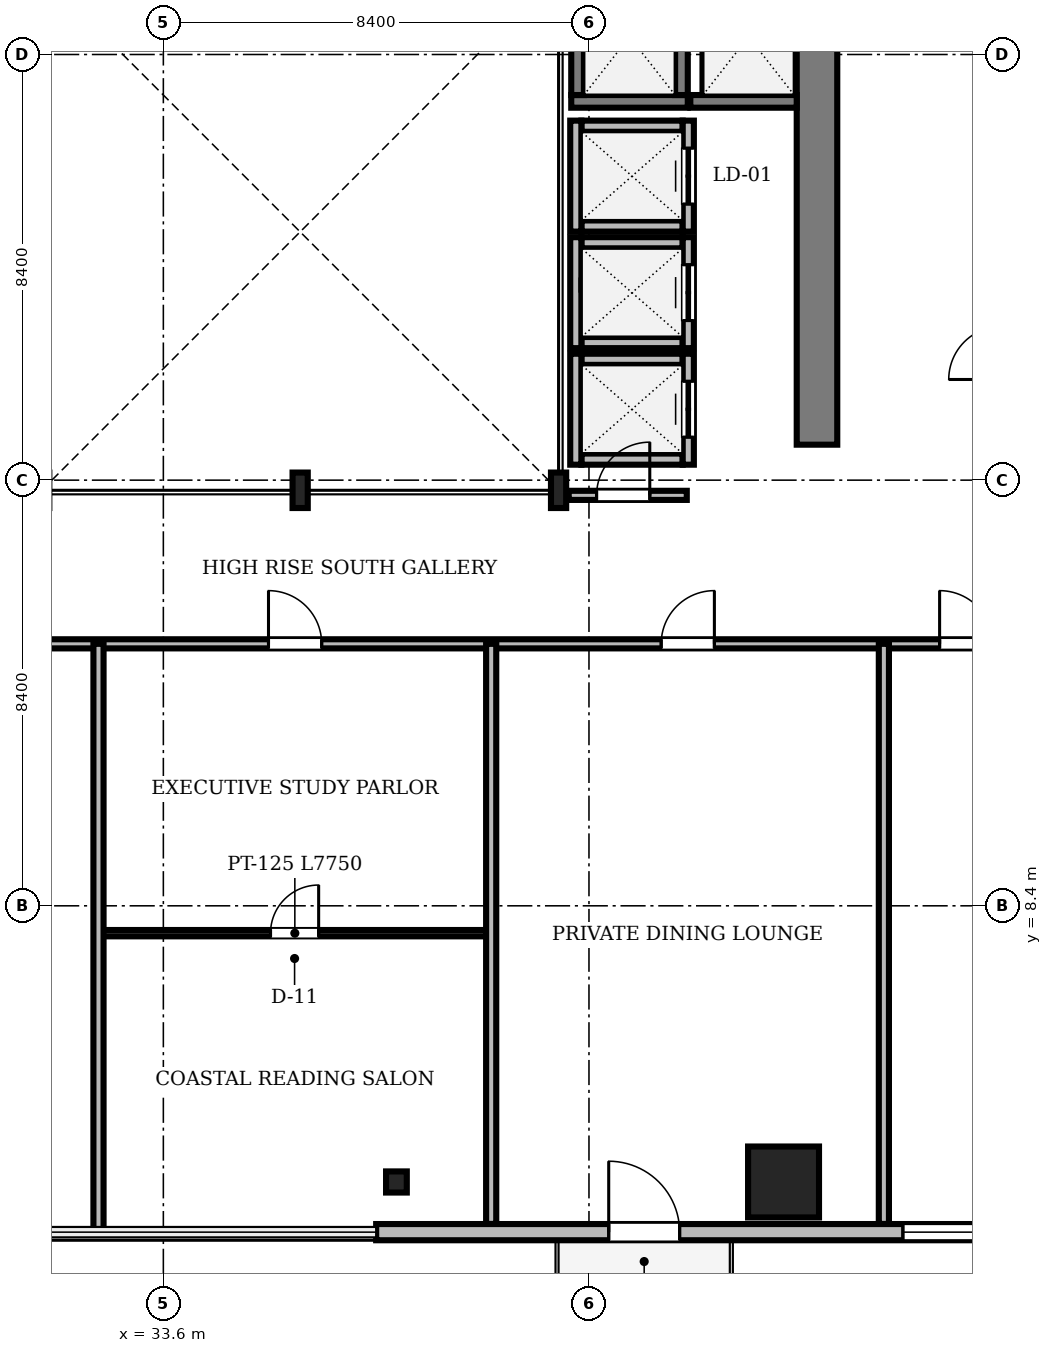
"""IFC4 building model, lengths in metres.
Left out: names, types, materials, properties, quantities, classifications, styles, units other than length and angle.
Written with IfcOpenShell. Run it as: python <this file> out.ifc"""

import sys

from ifc_helpers import new_model, si_unit, direction, frame, frame_2d, origin, origin_2d, place, context, subcontext, project, spatial, rectangle, i_section, extrude, source, transform, mapped, element, fill, save


model = new_model("IFC4")
c1 = context("Model", 3, precision=1e-05, world=origin(), true_north=direction((0.0, 1.0)))
c2 = subcontext(c1, "Body", "Model", "MODEL_VIEW")
j1 = project(units=[si_unit("LENGTHUNIT", "METRE"), si_unit("PLANEANGLEUNIT", "RADIAN")], contexts=[c1])
p1 = place(None, origin())
s1 = spatial("IfcSite", under=j1, at=p1, CompositionType="ELEMENT")
p2 = place(p1, origin())
s2 = spatial("IfcBuilding", under=s1, at=p2, CompositionType="ELEMENT")
p3 = place(p2, frame((0.0, 0.0, 192.3)))
s3 = spatial("IfcBuildingStorey", under=s2, at=p3, CompositionType="ELEMENT", Elevation=192.3)
m1 = source(origin(), c2, "Body", "SweptSolid", [
    extrude(rectangle(XDim=13.15, YDim=0.8, at=frame_2d((6.575, 0.0))), origin(), (0.0, 0.0, 1.0), 3.53),
])
p4 = place(p3, frame((46.5, 17.5, 0.0), z_axis=(0.0, 0.0, 1.0), x_axis=(0.0, 1.0, 0.0)))
e1 = element("IfcWall", 1, at=p4, inside=s3, PredefinedType="SHEAR", context=c2, shape_type="MappedRepresentation", body=[
    mapped(m1, transform((0.0, 0.0, 0.0), scale=1.0)),
])
m2 = source(origin(), c2, "Body", "SweptSolid", [
    extrude(i_section(OverallWidth=0.3, OverallDepth=0.7, WebThickness=0.017, FlangeThickness=0.032, FilletRadius=0.027, at=origin_2d()), origin(), (0.0, 0.0, 1.0), 3.53),
])
for number, where, z_axis, x_axis in (
    (2, (36.3, 16.6, 0.0), (0.0, 0.0, 1.0), (1.0, 0.0, 0.0)),
    (3, (41.4, 16.6, 0.0), (0.0, 0.0, 1.0), (1.0, 0.0, 0.0)),
):
    element("IfcColumn", number, at=place(p3, frame(where, z_axis=z_axis, x_axis=x_axis)), inside=s3, PredefinedType="COLUMN", context=c2, shape_type="MappedRepresentation", body=[
        mapped(m2, transform((0.0, 0.0, 0.0), scale=1.0)),
    ])
m3 = source(origin(), c2, "Body", "SweptSolid", [
    extrude(rectangle(XDim=1.4, YDim=1.4, at=origin_2d()), origin(), (0.0, 0.0, 1.0), 3.53),
])
p5 = place(p3, frame((45.84, 2.95, 0.0), z_axis=(0.0, 0.0, 1.0), x_axis=(1.0, 0.0, 0.0)))
e4 = element("IfcColumn", 4, at=p5, inside=s3, PredefinedType="COLUMN", context=c2, shape_type="MappedRepresentation", body=[
    mapped(m3, transform((0.0, 0.0, 0.0), scale=1.0)),
])
m4 = source(origin(), c2, "Body", "SweptSolid", [
    extrude(i_section(OverallWidth=0.409, OverallDepth=0.417, WebThickness=0.021, FlangeThickness=0.033, FilletRadius=0.015, at=origin_2d()), origin(), (0.0, 0.0, 1.0), 3.53),
])
p6 = place(p3, frame((38.2, 2.95, 0.0), z_axis=(0.0, 0.0, 1.0), x_axis=(1.0, 0.0, 0.0)))
e5 = element("IfcColumn", 5, at=p6, inside=s3, PredefinedType="COLUMN", context=c2, shape_type="MappedRepresentation", body=[
    mapped(m4, transform((0.0, 0.0, 0.0), scale=1.0)),
])
m5 = source(origin(), c2, "Body", "SweptSolid", [
    extrude(rectangle(XDim=15.6, YDim=0.32, at=frame_2d((7.8, 0.0))), origin(), (0.0, 0.0, 1.0), 3.53),
])
p7 = place(p3, frame((37.8, 1.96, 0.0), z_axis=(0.0, 0.0, 1.0), x_axis=(1.0, 0.0, 0.0)))
e6 = element("IfcWall", 6, at=p7, inside=s3, PredefinedType="SOLIDWALL", context=c2, shape_type="MappedRepresentation", body=[
    mapped(m5, transform((0.0, 0.0, 0.0), scale=1.0)),
])
m6 = source(origin(), c2, "Body", "SweptSolid", [
    extrude(rectangle(XDim=1.4, YDim=2.3, at=frame_2d((0.7, 1.15))), frame((0.0, 0.17, 0.0), z_axis=(0.0, -1.0, 0.0), x_axis=(1.0, 0.0, 0.0)), (0.0, 0.0, 1.0), 0.34),
])
p8 = place(p7, frame((4.59, 0.0, 0.0)))
e7 = element("IfcOpeningElement", 7, at=p8, cuts=e6, PredefinedType="OPENING", context=c2, shape_type="MappedRepresentation", body=[
    mapped(m6, transform((0.0, 0.0, 0.0), scale=1.0)),
])
m7 = source(origin(), c2, "Body", "SweptSolid", [
    extrude(rectangle(XDim=2.2, YDim=2.4, at=frame_2d((1.1, 1.2))), frame((0.0, 0.17, 0.0), z_axis=(0.0, -1.0, 0.0), x_axis=(1.0, 0.0, 0.0)), (0.0, 0.0, 1.0), 0.34),
])
p9 = place(p7, frame((10.395, 0.0, 0.72)))
e8 = element("IfcOpeningElement", 8, at=p9, cuts=e6, PredefinedType="OPENING", context=c2, shape_type="MappedRepresentation", body=[
    mapped(m7, transform((0.0, 0.0, 0.0), scale=1.0)),
])
m8 = source(origin(), c2, "Body", "SweptSolid", [
    extrude(rectangle(XDim=2.0, YDim=0.22, at=frame_2d((1.0, 0.0))), origin(), (0.0, 0.0, 1.0), 3.53),
])
for number, where, z_axis, x_axis in (
    (9, (41.85, 21.815, 0.0), (0.0, 0.0, 1.0), (1.0, 0.0, 0.0)),
    (10, (41.85, 23.785, 0.0), (0.0, 0.0, 1.0), (1.0, 0.0, 0.0)),
):
    element("IfcWall", number, at=place(p3, frame(where, z_axis=z_axis, x_axis=x_axis)), inside=s3, PredefinedType="SOLIDWALL", context=c2, shape_type="MappedRepresentation", body=[
        mapped(m8, transform((0.0, 0.0, 0.0), scale=1.0)),
    ])
m9 = source(origin(), c2, "Body", "SweptSolid", [
    extrude(rectangle(XDim=2.19, YDim=0.22, at=frame_2d((1.095, 0.0))), origin(), (0.0, 0.0, 1.0), 3.53),
])
p10 = place(p3, frame((41.74, 21.705, 0.0), z_axis=(0.0, 0.0, 1.0), x_axis=(0.0, 1.0, 0.0)))
e11 = element("IfcWall", 11, at=p10, inside=s3, PredefinedType="SOLIDWALL", context=c2, shape_type="MappedRepresentation", body=[
    mapped(m9, transform((0.0, 0.0, 0.0), scale=1.0)),
])
p11 = place(p3, frame((43.96, 21.705, 0.0), z_axis=(0.0, 0.0, 1.0), x_axis=(0.0, 1.0, 0.0)))
e12 = element("IfcWall", 12, at=p11, inside=s3, PredefinedType="SOLIDWALL", context=c2, shape_type="MappedRepresentation", body=[
    mapped(m9, transform((0.0, 0.0, 0.0), scale=1.0)),
])
m10 = source(origin(), c2, "Body", "SweptSolid", [
    extrude(rectangle(XDim=1.1, YDim=2.2, at=frame_2d((0.55, 1.1))), frame((0.0, 0.12, 0.0), z_axis=(0.0, -1.0, 0.0), x_axis=(1.0, 0.0, 0.0)), (0.0, 0.0, 1.0), 0.24),
])
p12 = place(p11, frame((0.545, 0.0, 0.0)))
e13 = element("IfcOpeningElement", 13, at=p12, cuts=e12, PredefinedType="OPENING", context=c2, shape_type="MappedRepresentation", body=[
    mapped(m10, transform((0.0, 0.0, 0.0), scale=1.0)),
])
for number, where, z_axis, x_axis in (
    (14, (41.85, 19.515, 0.0), (0.0, 0.0, 1.0), (1.0, 0.0, 0.0)),
    (15, (41.85, 21.485, 0.0), (0.0, 0.0, 1.0), (1.0, 0.0, 0.0)),
):
    element("IfcWall", number, at=place(p3, frame(where, z_axis=z_axis, x_axis=x_axis)), inside=s3, PredefinedType="SOLIDWALL", context=c2, shape_type="MappedRepresentation", body=[
        mapped(m8, transform((0.0, 0.0, 0.0), scale=1.0)),
    ])
p13 = place(p3, frame((41.74, 19.405, 0.0), z_axis=(0.0, 0.0, 1.0), x_axis=(0.0, 1.0, 0.0)))
e16 = element("IfcWall", 16, at=p13, inside=s3, PredefinedType="SOLIDWALL", context=c2, shape_type="MappedRepresentation", body=[
    mapped(m9, transform((0.0, 0.0, 0.0), scale=1.0)),
])
p14 = place(p3, frame((43.96, 19.405, 0.0), z_axis=(0.0, 0.0, 1.0), x_axis=(0.0, 1.0, 0.0)))
e17 = element("IfcWall", 17, at=p14, inside=s3, PredefinedType="SOLIDWALL", context=c2, shape_type="MappedRepresentation", body=[
    mapped(m9, transform((0.0, 0.0, 0.0), scale=1.0)),
])
p15 = place(p14, frame((0.545, 0.0, 0.0)))
e18 = element("IfcOpeningElement", 18, at=p15, cuts=e17, PredefinedType="OPENING", context=c2, shape_type="MappedRepresentation", body=[
    mapped(m10, transform((0.0, 0.0, 0.0), scale=1.0)),
])
for number, where, z_axis, x_axis in (
    (19, (41.85, 17.215, 0.0), (0.0, 0.0, 1.0), (1.0, 0.0, 0.0)),
    (20, (41.85, 19.185, 0.0), (0.0, 0.0, 1.0), (1.0, 0.0, 0.0)),
):
    element("IfcWall", number, at=place(p3, frame(where, z_axis=z_axis, x_axis=x_axis)), inside=s3, PredefinedType="SOLIDWALL", context=c2, shape_type="MappedRepresentation", body=[
        mapped(m8, transform((0.0, 0.0, 0.0), scale=1.0)),
    ])
p16 = place(p3, frame((41.74, 17.105, 0.0), z_axis=(0.0, 0.0, 1.0), x_axis=(0.0, 1.0, 0.0)))
e21 = element("IfcWall", 21, at=p16, inside=s3, PredefinedType="SOLIDWALL", context=c2, shape_type="MappedRepresentation", body=[
    mapped(m9, transform((0.0, 0.0, 0.0), scale=1.0)),
])
p17 = place(p3, frame((43.96, 17.105, 0.0), z_axis=(0.0, 0.0, 1.0), x_axis=(0.0, 1.0, 0.0)))
e22 = element("IfcWall", 22, at=p17, inside=s3, PredefinedType="SOLIDWALL", context=c2, shape_type="MappedRepresentation", body=[
    mapped(m9, transform((0.0, 0.0, 0.0), scale=1.0)),
])
p18 = place(p17, frame((0.545, 0.0, 0.0)))
e23 = element("IfcOpeningElement", 23, at=p18, cuts=e22, PredefinedType="OPENING", context=c2, shape_type="MappedRepresentation", body=[
    mapped(m10, transform((0.0, 0.0, 0.0), scale=1.0)),
])
m11 = source(origin(), c2, "Body", "SweptSolid", [
    extrude(rectangle(XDim=2.3, YDim=0.25, at=frame_2d((1.15, 0.0))), origin(), (0.0, 0.0, 1.0), 3.53),
])
for number, where, z_axis, x_axis in (
    (24, (41.65, 24.275, 0.0), (0.0, 0.0, 1.0), (1.0, 0.0, 0.0)),
    (25, (41.775, 24.4, 0.0), (0.0, 0.0, 1.0), (0.0, 1.0, 0.0)),
    (26, (43.825, 24.4, 0.0), (0.0, 0.0, 1.0), (0.0, 1.0, 0.0)),
):
    element("IfcWall", number, at=place(p3, frame(where, z_axis=z_axis, x_axis=x_axis)), inside=s3, PredefinedType="SOLIDWALL", context=c2, shape_type="MappedRepresentation", body=[
        mapped(m11, transform((0.0, 0.0, 0.0), scale=1.0)),
    ])
m12 = source(origin(), c2, "Body", "SweptSolid", [
    extrude(rectangle(XDim=2.1, YDim=0.25, at=frame_2d((1.05, 0.0))), origin(), (0.0, 0.0, 1.0), 3.53),
])
p19 = place(p3, frame((44.0, 24.275, 0.0), z_axis=(0.0, 0.0, 1.0), x_axis=(1.0, 0.0, 0.0)))
e27 = element("IfcWall", 27, at=p19, inside=s3, PredefinedType="SOLIDWALL", context=c2, shape_type="MappedRepresentation", body=[
    mapped(m12, transform((0.0, 0.0, 0.0), scale=1.0)),
])
m13 = source(origin(), c2, "Body", "SweptSolid", [
    extrude(rectangle(XDim=46.156, YDim=0.18, at=frame_2d((23.078, 0.0))), origin(), (0.0, 0.0, 1.0), 2.772),
])
p20 = place(p3, frame((11.422, 13.57, 0.0), z_axis=(0.0, 0.0, 1.0), x_axis=(1.0, 0.0, 0.0)))
e28 = element("IfcWall", 28, at=p20, inside=s3, PredefinedType="PARTITIONING", context=c2, shape_type="MappedRepresentation", body=[
    mapped(m13, transform((0.0, 0.0, 0.0), scale=1.0)),
])
m14 = source(origin(), c2, "Body", "SweptSolid", [
    extrude(rectangle(XDim=1.05, YDim=2.2, at=frame_2d((0.525, 1.1))), frame((0.0, 0.1, 0.0), z_axis=(0.0, -1.0, 0.0), x_axis=(1.0, 0.0, 0.0)), (0.0, 0.0, 1.0), 0.2),
])
p21 = place(p20, frame((11.798, 0.0, 0.0)))
e29 = element("IfcOpeningElement", 29, at=p21, cuts=e28, PredefinedType="OPENING", context=c2, shape_type="MappedRepresentation", body=[
    mapped(m14, transform((0.0, 0.0, 0.0), scale=1.0)),
])
p22 = place(p20, frame((16.503, 0.0, 0.0)))
e30 = element("IfcOpeningElement", 30, at=p22, cuts=e28, PredefinedType="OPENING", context=c2, shape_type="MappedRepresentation", body=[
    mapped(m14, transform((0.0, 0.0, 0.0), scale=1.0)),
])
p23 = place(p20, frame((24.253, 0.0, 0.0)))
e31 = element("IfcOpeningElement", 31, at=p23, cuts=e28, PredefinedType="OPENING", context=c2, shape_type="MappedRepresentation", body=[
    mapped(m14, transform((0.0, 0.0, 0.0), scale=1.0)),
])
p24 = place(p20, frame((32.003, 0.0, 0.0)))
e32 = element("IfcOpeningElement", 32, at=p24, cuts=e28, PredefinedType="OPENING", context=c2, shape_type="MappedRepresentation", body=[
    mapped(m14, transform((0.0, 0.0, 0.0), scale=1.0)),
])
p25 = place(p20, frame((37.498, 0.0, 0.0)))
e33 = element("IfcOpeningElement", 33, at=p25, cuts=e28, PredefinedType="OPENING", context=c2, shape_type="MappedRepresentation", body=[
    mapped(m14, transform((0.0, 0.0, 0.0), scale=1.0)),
])
m15 = source(origin(), c2, "Body", "SweptSolid", [
    extrude(rectangle(XDim=7.75, YDim=0.125, at=frame_2d((3.875, 0.0))), origin(), (0.0, 0.0, 1.0), 2.972),
])
p26 = place(p3, frame((32.32, 7.86, 0.0), z_axis=(0.0, 0.0, 1.0), x_axis=(1.0, 0.0, 0.0)))
e34 = element("IfcWall", 34, at=p26, inside=s3, PredefinedType="PARTITIONING", context=c2, shape_type="MappedRepresentation", body=[
    mapped(m15, transform((0.0, 0.0, 0.0), scale=1.0)),
])
m16 = source(origin(), c2, "Body", "SweptSolid", [
    extrude(rectangle(XDim=0.95, YDim=2.15, at=frame_2d((0.475, 1.075))), frame((0.0, 0.073, 0.0), z_axis=(0.0, -1.0, 0.0), x_axis=(1.0, 0.0, 0.0)), (0.0, 0.0, 1.0), 0.145),
])
p27 = place(p26, frame((3.395, 0.0, 0.0)))
e35 = element("IfcOpeningElement", 35, at=p27, cuts=e34, PredefinedType="OPENING", context=c2, shape_type="MappedRepresentation", body=[
    mapped(m16, transform((0.0, 0.0, 0.0), scale=1.0)),
])
m17 = source(origin(), c2, "Body", "SweptSolid", [
    extrude(rectangle(XDim=2.33, YDim=0.18, at=frame_2d((1.165, 0.0))), origin(), (0.0, 0.0, 1.0), 2.972),
])
p28 = place(p3, frame((41.6, 16.5, 0.0), z_axis=(0.0, 0.0, 1.0), x_axis=(1.0, 0.0, 0.0)))
e36 = element("IfcWall", 36, at=p28, inside=s3, PredefinedType="PARTITIONING", context=c2, shape_type="MappedRepresentation", body=[
    mapped(m17, transform((0.0, 0.0, 0.0), scale=1.0)),
])
p29 = place(p28, frame((0.55, 0.0, 0.0)))
e37 = element("IfcOpeningElement", 37, at=p29, cuts=e36, PredefinedType="OPENING", context=c2, shape_type="MappedRepresentation", body=[
    mapped(m14, transform((0.0, 0.0, 0.0), scale=1.0)),
])
m18 = source(origin(), c2, "Body", "SweptSolid", [
    extrude(rectangle(XDim=11.64, YDim=0.2, at=frame_2d((5.82, 0.0))), origin(), (0.0, 0.0, 1.0), 2.772),
])
p30 = place(p3, frame((32.32, 1.93, 0.0), z_axis=(0.0, 0.0, 1.0), x_axis=(0.0, 1.0, 0.0)))
e38 = element("IfcWall", 38, at=p30, inside=s3, PredefinedType="PARTITIONING", context=c2, shape_type="MappedRepresentation", body=[
    mapped(m18, transform((0.0, 0.0, 0.0), scale=1.0)),
])
m19 = source(origin(), c2, "Body", "SweptSolid", [
    extrude(rectangle(XDim=11.448, YDim=0.2, at=frame_2d((5.724, 0.0))), origin(), (0.0, 0.0, 1.0), 2.772),
])
for number, where, z_axis, x_axis in (
    (39, (40.07, 2.122, 0.0), (0.0, 0.0, 1.0), (0.0, 1.0, 0.0)),
    (40, (47.82, 2.122, 0.0), (0.0, 0.0, 1.0), (0.0, 1.0, 0.0)),
):
    element("IfcWall", number, at=place(p3, frame(where, z_axis=z_axis, x_axis=x_axis)), inside=s3, PredefinedType="PARTITIONING", context=c2, shape_type="MappedRepresentation", body=[
        mapped(m19, transform((0.0, 0.0, 0.0), scale=1.0)),
    ])
m20 = source(origin(), c2, "Body", "SweptSolid", [
    extrude(rectangle(XDim=1.858, YDim=0.18, at=frame_2d((0.929, 0.0))), origin(), (0.0, 0.0, 1.0), 3.53),
])
p31 = place(p3, frame((41.852, 20.65, 0.0), z_axis=(0.0, 0.0, 1.0), x_axis=(1.0, 0.0, 0.0)))
e41 = element("IfcWall", 41, at=p31, inside=s3, PredefinedType="PARTITIONING", context=c2, shape_type="MappedRepresentation", body=[
    mapped(m20, transform((0.0, 0.0, 0.0), scale=1.0)),
])
m21 = source(origin(), c2, "Body", "SweptSolid", [
    extrude(rectangle(XDim=1.4, YDim=2.3, at=frame_2d((0.7, 1.15))), frame((0.0, 0.025, 0.0), z_axis=(0.0, -1.0, 0.0), x_axis=(1.0, 0.0, 0.0)), (0.0, 0.0, 1.0), 0.05),
])
p32 = place(p8, frame((1.4, 0.0, 0.0), z_axis=(0.0, 0.0, 1.0), x_axis=(-1.0, 0.0, 0.0)))
e42 = element("IfcDoor", 42, at=p32, inside=s3, OperationType="DOUBLE_DOOR_SLIDING", PredefinedType="DOOR", context=c2, shape_type="MappedRepresentation", body=[
    mapped(m21, transform((0.0, 0.0, 0.0), scale=1.0)),
])
fill(e7, e42)
m22 = source(origin(), c2, "Body", "SweptSolid", [
    extrude(rectangle(XDim=2.2, YDim=2.4, at=frame_2d((1.1, 1.2))), frame((0.0, 0.03, 0.0), z_axis=(0.0, -1.0, 0.0), x_axis=(1.0, 0.0, 0.0)), (0.0, 0.0, 1.0), 0.06),
])
p33 = place(p9, origin())
e43 = element("IfcWindow", 43, at=p33, inside=s3, PartitioningType="SINGLE_PANEL", PredefinedType="WINDOW", context=c2, shape_type="MappedRepresentation", body=[
    mapped(m22, transform((0.0, 0.0, 0.0), scale=1.0)),
])
fill(e8, e43)
m23 = source(origin(), c2, "Body", "SweptSolid", [
    extrude(rectangle(XDim=1.1, YDim=2.2, at=frame_2d((0.55, 1.1))), frame((0.0, 0.025, 0.0), z_axis=(0.0, -1.0, 0.0), x_axis=(1.0, 0.0, 0.0)), (0.0, 0.0, 1.0), 0.05),
])
p34 = place(p12, origin())
e44 = element("IfcDoor", 44, at=p34, inside=s3, OperationType="DOUBLE_DOOR_SLIDING", PredefinedType="DOOR", context=c2, shape_type="MappedRepresentation", body=[
    mapped(m23, transform((0.0, 0.0, 0.0), scale=1.0)),
])
fill(e13, e44)
p35 = place(p15, origin())
e45 = element("IfcDoor", 45, at=p35, inside=s3, OperationType="DOUBLE_DOOR_SLIDING", PredefinedType="DOOR", context=c2, shape_type="MappedRepresentation", body=[
    mapped(m23, transform((0.0, 0.0, 0.0), scale=1.0)),
])
fill(e18, e45)
p36 = place(p18, origin())
e46 = element("IfcDoor", 46, at=p36, inside=s3, OperationType="DOUBLE_DOOR_SLIDING", PredefinedType="DOOR", context=c2, shape_type="MappedRepresentation", body=[
    mapped(m23, transform((0.0, 0.0, 0.0), scale=1.0)),
])
fill(e23, e46)
m24 = source(origin(), c2, "Body", "SweptSolid", [
    extrude(rectangle(XDim=1.05, YDim=2.2, at=frame_2d((0.525, 1.1))), frame((0.0, 0.025, 0.0), z_axis=(0.0, -1.0, 0.0), x_axis=(1.0, 0.0, 0.0)), (0.0, 0.0, 1.0), 0.05),
])
p37 = place(p23, origin())
e47 = element("IfcDoor", 47, at=p37, inside=s3, OperationType="SINGLE_SWING_LEFT", PredefinedType="DOOR", context=c2, shape_type="MappedRepresentation", body=[
    mapped(m24, transform((0.0, 0.0, 0.0), scale=1.0)),
])
fill(e31, e47)
p38 = place(p24, origin())
e48 = element("IfcDoor", 48, at=p38, inside=s3, OperationType="SINGLE_SWING_RIGHT", PredefinedType="DOOR", context=c2, shape_type="MappedRepresentation", body=[
    mapped(m24, transform((0.0, 0.0, 0.0), scale=1.0)),
])
fill(e32, e48)
p39 = place(p25, origin())
e49 = element("IfcDoor", 49, at=p39, inside=s3, OperationType="SINGLE_SWING_LEFT", PredefinedType="DOOR", context=c2, shape_type="MappedRepresentation", body=[
    mapped(m24, transform((0.0, 0.0, 0.0), scale=1.0)),
])
fill(e33, e49)
m25 = source(origin(), c2, "Body", "SweptSolid", [
    extrude(rectangle(XDim=0.95, YDim=2.15, at=frame_2d((0.475, 1.075))), frame((0.0, 0.025, 0.0), z_axis=(0.0, -1.0, 0.0), x_axis=(1.0, 0.0, 0.0)), (0.0, 0.0, 1.0), 0.05),
])
p40 = place(p27, origin())
e50 = element("IfcDoor", 50, at=p40, inside=s3, OperationType="SINGLE_SWING_RIGHT", PredefinedType="DOOR", context=c2, shape_type="MappedRepresentation", body=[
    mapped(m25, transform((0.0, 0.0, 0.0), scale=1.0)),
])
fill(e35, e50)
p41 = place(p29, origin())
e51 = element("IfcDoor", 51, at=p41, inside=s3, OperationType="SINGLE_SWING_RIGHT", PredefinedType="DOOR", context=c2, shape_type="MappedRepresentation", body=[
    mapped(m24, transform((0.0, 0.0, 0.0), scale=1.0)),
])
fill(e37, e51)
save(model, sys.argv[1])
